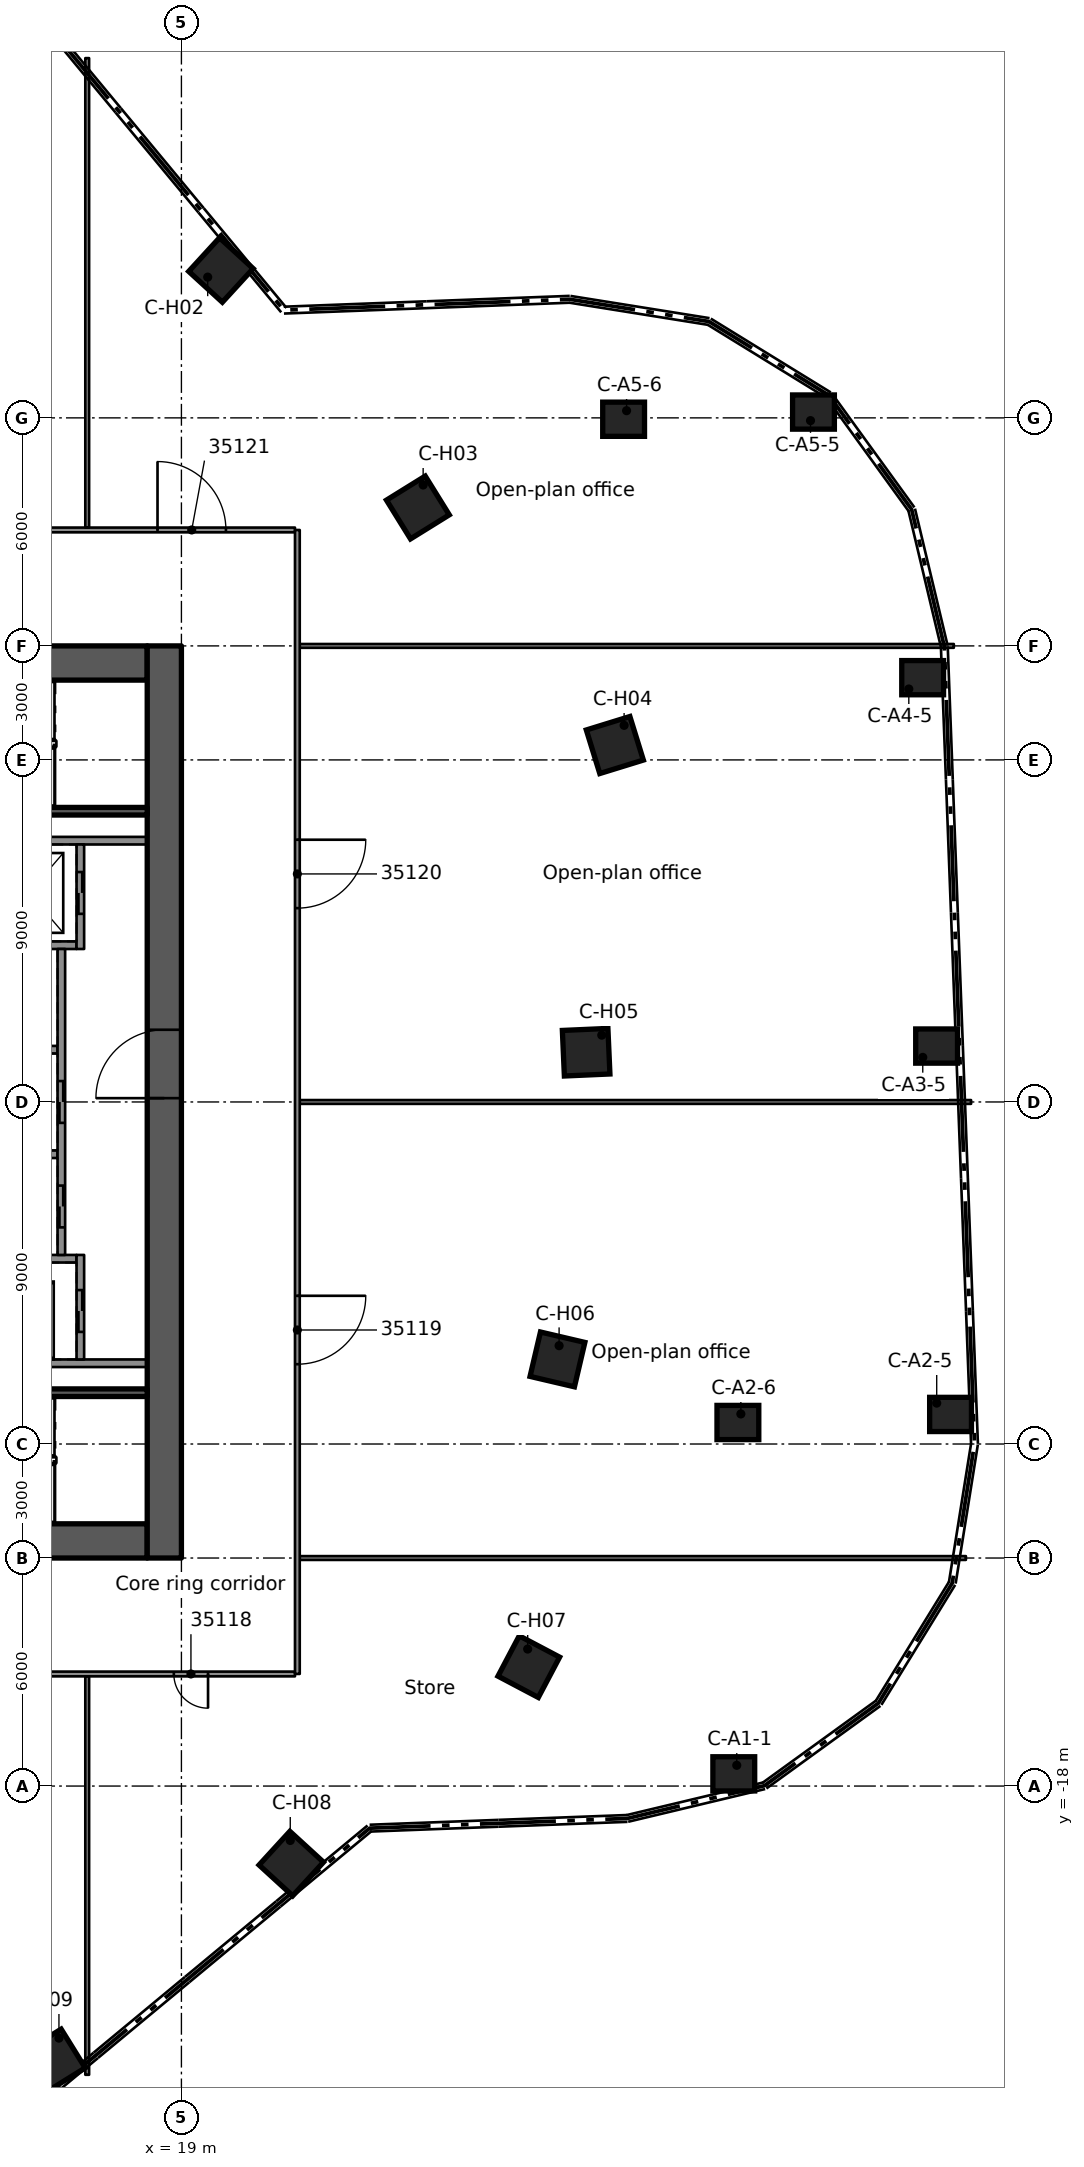
"""IFC4 building model, lengths in metres.
Left out: names, types, materials, properties, quantities, classifications, styles, units other than length and angle.
Written with IfcOpenShell. Run it as: python <this file> out.ifc"""

import sys

from ifc_helpers import new_model, si_unit, direction, frame, frame_2d, origin, origin_2d, place, context, subcontext, project, spatial, rectangle, extrude, element, fill, save


model = new_model("IFC4")
c1 = context("Model", 3, precision=1e-05, world=origin(), true_north=direction((0.0, 1.0)))
c2 = subcontext(c1, "Body", "Model", "MODEL_VIEW")
j1 = project(units=[si_unit("LENGTHUNIT", "METRE"), si_unit("PLANEANGLEUNIT", "RADIAN")], contexts=[c1])
p1 = place(None, origin())
s1 = spatial("IfcSite", under=j1, at=p1, CompositionType="ELEMENT")
p2 = place(p1, origin())
s2 = spatial("IfcBuilding", under=s1, at=p2, CompositionType="ELEMENT")
p3 = place(p2, frame((0.0, 0.0, 170.6)))
s3 = spatial("IfcBuildingStorey", under=s2, at=p3, CompositionType="ELEMENT", Elevation=170.6)
p4 = place(p3, frame((8.9, 11.55, 0.0), z_axis=(0.0, 0.0, 1.0), x_axis=(1.0, 0.0, 0.0)))
e1 = element("IfcWall", 1, at=p4, inside=s3, PredefinedType="SHEAR", context=c2, shape_type="SweptSolid", body=[
    extrude(rectangle(XDim=9.2, YDim=0.9, at=frame_2d((4.6, 0.0))), origin(), (0.0, 0.0, 1.0), 3.5),
])
p5 = place(p4, frame((3.0, 0.0, 0.0)))
e2 = element("IfcOpeningElement", 2, at=p5, cuts=e1, PredefinedType="OPENING", context=c2, shape_type="SweptSolid", body=[
    extrude(rectangle(XDim=1.1, YDim=2.1, at=frame_2d((0.55, 1.05))), frame((0.0, 0.46, 0.0), z_axis=(0.0, -1.0, 0.0), x_axis=(1.0, 0.0, 0.0)), (0.0, 0.0, 1.0), 0.92),
])
p6 = place(p4, frame((0.77, 0.0, 0.0)))
e3 = element("IfcOpeningElement", 3, at=p6, cuts=e1, PredefinedType="OPENING", context=c2, shape_type="SweptSolid", body=[
    extrude(rectangle(XDim=0.9, YDim=2.1, at=frame_2d((0.45, 1.05))), frame((0.0, 0.46, 0.0), z_axis=(0.0, -1.0, 0.0), x_axis=(1.0, 0.0, 0.0)), (0.0, 0.0, 1.0), 0.92),
])
p7 = place(p3, frame((8.9, -11.55, 0.0), z_axis=(0.0, 0.0, 1.0), x_axis=(1.0, 0.0, 0.0)))
e4 = element("IfcWall", 4, at=p7, inside=s3, PredefinedType="SHEAR", context=c2, shape_type="SweptSolid", body=[
    extrude(rectangle(XDim=9.2, YDim=0.9, at=frame_2d((4.6, 0.0))), origin(), (0.0, 0.0, 1.0), 3.5),
])
p8 = place(p7, frame((3.0, 0.0, 0.0)))
e5 = element("IfcOpeningElement", 5, at=p8, cuts=e4, PredefinedType="OPENING", context=c2, shape_type="SweptSolid", body=[
    extrude(rectangle(XDim=1.1, YDim=2.1, at=frame_2d((0.55, 1.05))), frame((0.0, 0.46, 0.0), z_axis=(0.0, -1.0, 0.0), x_axis=(1.0, 0.0, 0.0)), (0.0, 0.0, 1.0), 0.92),
])
p9 = place(p3, frame((18.55, -12.0, 0.0), z_axis=(0.0, 0.0, 1.0), x_axis=(0.0, 1.0, 0.0)))
e6 = element("IfcWall", 6, at=p9, inside=s3, PredefinedType="SHEAR", context=c2, shape_type="SweptSolid", body=[
    extrude(rectangle(XDim=24.0, YDim=0.9, at=frame_2d((12.0, 0.0))), origin(), (0.0, 0.0, 1.0), 3.5),
])
p10 = place(p9, frame((12.1, 0.0, 0.0)))
e7 = element("IfcOpeningElement", 7, at=p10, cuts=e6, PredefinedType="OPENING", context=c2, shape_type="SweptSolid", body=[
    extrude(rectangle(XDim=1.8, YDim=2.1, at=frame_2d((0.9, 1.05))), frame((0.0, 0.46, 0.0), z_axis=(0.0, -1.0, 0.0), x_axis=(1.0, 0.0, 0.0)), (0.0, 0.0, 1.0), 0.92),
])
for number, where, z_axis, x_axis in (
    (8, (33.535, -17.679, 0.0), (0.0, 0.0, 1.0), (1.0, 0.0, 0.0)),
    (9, (39.239, -8.222, 0.0), (0.0, 0.0, 1.0), (1.0, 0.0, 0.0)),
    (10, (33.643, -8.434, 0.0), (0.0, 0.0, 1.0), (1.0, 0.0, 0.0)),
    (11, (38.872, 1.471, 0.0), (0.0, 0.0, 1.0), (1.0, 0.0, 0.0)),
    (12, (38.505, 11.164, 0.0), (0.0, 0.0, 1.0), (1.0, 0.0, 0.0)),
    (13, (35.632, 18.153, 0.0), (0.0, 0.0, 1.0), (1.0, 0.0, 0.0)),
    (14, (30.636, 17.964, 0.0), (0.0, 0.0, 1.0), (1.0, 0.0, 0.0)),
):
    element("IfcColumn", number, at=place(p3, frame(where, z_axis=z_axis, x_axis=x_axis)), inside=s3, PredefinedType="COLUMN", context=c2, shape_type="SweptSolid", body=[
        extrude(rectangle(XDim=1.1, YDim=0.9, at=origin_2d()), origin(), (0.0, 0.0, 1.0), 3.5),
    ])
for number, where, z_axis, x_axis in (
    (15, (14.858, 28.141, 0.0), (0.0, 0.0, 1.0), (0.467, 0.884, 0.0)),
    (16, (20.04, 21.891, 0.0), (0.0, 0.0, 1.0), (0.675, 0.738, 0.0)),
    (17, (25.222, 15.642, 0.0), (0.0, 0.0, 1.0), (0.85, 0.527, 0.0)),
    (18, (30.405, 9.392, 0.0), (0.0, 0.0, 1.0), (0.955, 0.295, 0.0)),
    (19, (29.65, 1.309, 0.0), (0.0, 0.0, 1.0), (0.999, 0.044, 0.0)),
    (20, (28.895, -6.774, 0.0), (0.0, 0.0, 1.0), (0.974, -0.228, 0.0)),
    (21, (28.141, -14.858, 0.0), (0.0, 0.0, 1.0), (0.884, -0.467, 0.0)),
    (22, (21.891, -20.04, 0.0), (0.0, 0.0, 1.0), (0.738, -0.675, 0.0)),
    (23, (15.642, -25.222, 0.0), (0.0, 0.0, 1.0), (0.527, -0.85, 0.0)),
):
    element("IfcColumn", number, at=place(p3, frame(where, z_axis=z_axis, x_axis=x_axis)), inside=s3, PredefinedType="COLUMN", context=c2, shape_type="SweptSolid", body=[
        extrude(rectangle(XDim=1.2, YDim=1.2, at=origin_2d()), origin(), (0.0, 0.0, 1.0), 3.5),
    ])
for number, where, z_axis, x_axis in (
    (24, (11.54, -6.875, 0.0), (0.0, 0.0, 1.0), (1.0, 0.0, 0.0)),
    (25, (11.54, 6.875, 0.0), (0.0, 0.0, 1.0), (1.0, 0.0, 0.0)),
):
    element("IfcWall", number, at=place(p3, frame(where, z_axis=z_axis, x_axis=x_axis)), inside=s3, PredefinedType="SOLIDWALL", context=c2, shape_type="SweptSolid", body=[
        extrude(rectangle(XDim=6.56, YDim=0.2, at=frame_2d((3.28, 0.0))), origin(), (0.0, 0.0, 1.0), 3.08),
    ])
p11 = place(p3, frame((13.74, 4.125, 0.0), z_axis=(0.0, 0.0, 1.0), x_axis=(1.0, 0.0, 0.0)))
e26 = element("IfcWall", 26, at=p11, inside=s3, PredefinedType="SOLIDWALL", context=c2, shape_type="SweptSolid", body=[
    extrude(rectangle(XDim=2.5, YDim=0.2, at=frame_2d((1.25, 0.0))), origin(), (0.0, 0.0, 1.0), 3.08),
])
p12 = place(p3, frame((13.74, 1.375, 0.0), z_axis=(0.0, 0.0, 1.0), x_axis=(1.0, 0.0, 0.0)))
e27 = element("IfcWall", 27, at=p12, inside=s3, PredefinedType="SOLIDWALL", context=c2, shape_type="SweptSolid", body=[
    extrude(rectangle(XDim=2.0, YDim=0.2, at=frame_2d((1.0, 0.0))), origin(), (0.0, 0.0, 1.0), 3.08),
])
p13 = place(p3, frame((11.54, -1.375, 0.0), z_axis=(0.0, 0.0, 1.0), x_axis=(1.0, 0.0, 0.0)))
e28 = element("IfcWall", 28, at=p13, inside=s3, PredefinedType="SOLIDWALL", context=c2, shape_type="SweptSolid", body=[
    extrude(rectangle(XDim=4.2, YDim=0.2, at=frame_2d((2.1, 0.0))), origin(), (0.0, 0.0, 1.0), 3.08),
])
p14 = place(p3, frame((11.54, -4.125, 0.0), z_axis=(0.0, 0.0, 1.0), x_axis=(1.0, 0.0, 0.0)))
e29 = element("IfcWall", 29, at=p14, inside=s3, PredefinedType="SOLIDWALL", context=c2, shape_type="SweptSolid", body=[
    extrude(rectangle(XDim=4.7, YDim=0.2, at=frame_2d((2.35, 0.0))), origin(), (0.0, 0.0, 1.0), 3.08),
])
p15 = place(p3, frame((16.34, 6.775, 0.0), z_axis=(0.0, 0.0, 1.0), x_axis=(0.0, -1.0, 0.0)))
e30 = element("IfcWall", 30, at=p15, inside=s3, PredefinedType="SOLIDWALL", context=c2, shape_type="SweptSolid", body=[
    extrude(rectangle(XDim=2.75, YDim=0.2, at=frame_2d((1.375, 0.0))), origin(), (0.0, 0.0, 1.0), 3.08),
])
p16 = place(p15, frame((0.725, 0.0, 0.0)))
e31 = element("IfcOpeningElement", 31, at=p16, cuts=e30, PredefinedType="OPENING", context=c2, shape_type="SweptSolid", body=[
    extrude(rectangle(XDim=1.1, YDim=2.1, at=frame_2d((0.55, 1.05))), frame((0.0, 0.11, 0.0), z_axis=(0.0, -1.0, 0.0), x_axis=(1.0, 0.0, 0.0)), (0.0, 0.0, 1.0), 0.22),
])
p17 = place(p3, frame((15.84, 4.025, 0.0), z_axis=(0.0, 0.0, 1.0), x_axis=(0.0, -1.0, 0.0)))
e32 = element("IfcWall", 32, at=p17, inside=s3, PredefinedType="SOLIDWALL", context=c2, shape_type="SweptSolid", body=[
    extrude(rectangle(XDim=8.05, YDim=0.2, at=frame_2d((4.025, 0.0))), origin(), (0.0, 0.0, 1.0), 3.08),
])
p18 = place(p17, frame((3.475, 0.0, 0.0)))
e33 = element("IfcOpeningElement", 33, at=p18, cuts=e32, PredefinedType="OPENING", context=c2, shape_type="SweptSolid", body=[
    extrude(rectangle(XDim=1.1, YDim=2.1, at=frame_2d((0.55, 1.05))), frame((0.0, 0.11, 0.0), z_axis=(0.0, -1.0, 0.0), x_axis=(1.0, 0.0, 0.0)), (0.0, 0.0, 1.0), 0.22),
])
p19 = place(p17, frame((6.225, 0.0, 0.0)))
e34 = element("IfcOpeningElement", 34, at=p19, cuts=e32, PredefinedType="OPENING", context=c2, shape_type="SweptSolid", body=[
    extrude(rectangle(XDim=1.1, YDim=2.1, at=frame_2d((0.55, 1.05))), frame((0.0, 0.11, 0.0), z_axis=(0.0, -1.0, 0.0), x_axis=(1.0, 0.0, 0.0)), (0.0, 0.0, 1.0), 0.22),
])
p20 = place(p3, frame((16.34, -4.025, 0.0), z_axis=(0.0, 0.0, 1.0), x_axis=(0.0, -1.0, 0.0)))
e35 = element("IfcWall", 35, at=p20, inside=s3, PredefinedType="SOLIDWALL", context=c2, shape_type="SweptSolid", body=[
    extrude(rectangle(XDim=2.75, YDim=0.2, at=frame_2d((1.375, 0.0))), origin(), (0.0, 0.0, 1.0), 3.08),
])
p21 = place(p20, frame((0.925, 0.0, 0.0)))
e36 = element("IfcOpeningElement", 36, at=p21, cuts=e35, PredefinedType="OPENING", context=c2, shape_type="SweptSolid", body=[
    extrude(rectangle(XDim=1.1, YDim=2.1, at=frame_2d((0.55, 1.05))), frame((0.0, 0.11, 0.0), z_axis=(0.0, -1.0, 0.0), x_axis=(1.0, 0.0, 0.0)), (0.0, 0.0, 1.0), 0.22),
])
for number, where, z_axis, x_axis in (
    (37, (11.54, -7.65, 0.0), (0.0, 0.0, 1.0), (1.0, 0.0, 0.0)),
    (38, (11.54, 7.65, 0.0), (0.0, 0.0, 1.0), (1.0, 0.0, 0.0)),
):
    element("IfcWall", number, at=place(p3, frame(where, z_axis=z_axis, x_axis=x_axis)), inside=s3, PredefinedType="SOLIDWALL", context=c2, shape_type="SweptSolid", body=[
        extrude(rectangle(XDim=6.56, YDim=0.2, at=frame_2d((3.28, 0.0))), origin(), (0.0, 0.0, 1.0), 3.08),
    ])
p22 = place(p3, frame((21.988, -15.051, 0.0), z_axis=(0.0, 0.0, 1.0), x_axis=(-1.0, 0.0, 0.0)))
e39 = element("IfcWall", 39, at=p22, inside=s3, PredefinedType="PARTITIONING", context=c2, shape_type="SweptSolid", body=[
    extrude(rectangle(XDim=10.997, YDim=0.125, at=frame_2d((5.499, 0.0))), origin(), (0.0, 0.0, 1.0), 3.06),
])
p23 = place(p22, frame((7.816, 0.0, 0.0)))
e40 = element("IfcOpeningElement", 40, at=p23, cuts=e39, PredefinedType="OPENING", context=c2, shape_type="SweptSolid", body=[
    extrude(rectangle(XDim=0.9, YDim=2.1, at=frame_2d((0.45, 1.05))), frame((0.0, 0.073, 0.0), z_axis=(0.0, -1.0, 0.0), x_axis=(1.0, 0.0, 0.0)), (0.0, 0.0, 1.0), 0.145),
])
p24 = place(p22, frame((2.288, 0.0, 0.0)))
e41 = element("IfcOpeningElement", 41, at=p24, cuts=e39, PredefinedType="OPENING", context=c2, shape_type="SweptSolid", body=[
    extrude(rectangle(XDim=0.9, YDim=2.1, at=frame_2d((0.45, 1.05))), frame((0.0, 0.073, 0.0), z_axis=(0.0, -1.0, 0.0), x_axis=(1.0, 0.0, 0.0)), (0.0, 0.0, 1.0), 0.145),
])
p25 = place(p3, frame((22.113, -12.0, 0.0), z_axis=(0.0, 0.0, 1.0), x_axis=(1.0, 0.0, 0.0)))
e42 = element("IfcWall", 42, at=p25, inside=s3, PredefinedType="PARTITIONING", context=c2, shape_type="SweptSolid", body=[
    extrude(rectangle(XDim=17.53, YDim=0.1, at=frame_2d((8.765, 0.0))), origin(), (0.0, 0.0, 1.0), 3.06),
])
p26 = place(p3, frame((22.113, 0.0, 0.0), z_axis=(0.0, 0.0, 1.0), x_axis=(1.0, 0.0, 0.0)))
e43 = element("IfcWall", 43, at=p26, inside=s3, PredefinedType="PARTITIONING", context=c2, shape_type="SweptSolid", body=[
    extrude(rectangle(XDim=17.666, YDim=0.1, at=frame_2d((8.833, 0.0))), origin(), (0.0, 0.0, 1.0), 3.06),
])
p27 = place(p3, frame((22.113, 12.0, 0.0), z_axis=(0.0, 0.0, 1.0), x_axis=(1.0, 0.0, 0.0)))
e44 = element("IfcWall", 44, at=p27, inside=s3, PredefinedType="PARTITIONING", context=c2, shape_type="SweptSolid", body=[
    extrude(rectangle(XDim=17.212, YDim=0.1, at=frame_2d((8.606, 0.0))), origin(), (0.0, 0.0, 1.0), 3.06),
])
p28 = place(p3, frame((10.991, 15.051, 0.0), z_axis=(0.0, 0.0, 1.0), x_axis=(1.0, 0.0, 0.0)))
e45 = element("IfcWall", 45, at=p28, inside=s3, PredefinedType="PARTITIONING", context=c2, shape_type="SweptSolid", body=[
    extrude(rectangle(XDim=10.997, YDim=0.125, at=frame_2d((5.499, 0.0))), origin(), (0.0, 0.0, 1.0), 3.06),
])
p29 = place(p28, frame((7.38, 0.0, 0.0)))
e46 = element("IfcOpeningElement", 46, at=p29, cuts=e45, PredefinedType="OPENING", context=c2, shape_type="SweptSolid", body=[
    extrude(rectangle(XDim=1.8, YDim=2.1, at=frame_2d((0.9, 1.05))), frame((0.0, 0.073, 0.0), z_axis=(0.0, -1.0, 0.0), x_axis=(1.0, 0.0, 0.0)), (0.0, 0.0, 1.0), 0.145),
])
p30 = place(p3, frame((22.051, 15.05, 0.0), z_axis=(0.0, 0.0, 1.0), x_axis=(0.0, -1.0, 0.0)))
e47 = element("IfcWall", 47, at=p30, inside=s3, PredefinedType="PARTITIONING", context=c2, shape_type="SweptSolid", body=[
    extrude(rectangle(XDim=30.1, YDim=0.125, at=frame_2d((15.05, 0.0))), origin(), (0.0, 0.0, 1.0), 3.06),
])
p31 = place(p30, frame((20.15, 0.0, 0.0)))
e48 = element("IfcOpeningElement", 48, at=p31, cuts=e47, PredefinedType="OPENING", context=c2, shape_type="SweptSolid", body=[
    extrude(rectangle(XDim=1.8, YDim=2.1, at=frame_2d((0.9, 1.05))), frame((0.0, 0.073, 0.0), z_axis=(0.0, -1.0, 0.0), x_axis=(1.0, 0.0, 0.0)), (0.0, 0.0, 1.0), 0.145),
])
p32 = place(p30, frame((8.15, 0.0, 0.0)))
e49 = element("IfcOpeningElement", 49, at=p32, cuts=e47, PredefinedType="OPENING", context=c2, shape_type="SweptSolid", body=[
    extrude(rectangle(XDim=1.8, YDim=2.1, at=frame_2d((0.9, 1.05))), frame((0.0, 0.073, 0.0), z_axis=(0.0, -1.0, 0.0), x_axis=(1.0, 0.0, 0.0)), (0.0, 0.0, 1.0), 0.145),
])
p33 = place(p3, frame((16.521, -25.597, 0.0), z_axis=(0.0, 0.0, 1.0), x_axis=(0.0, 1.0, 0.0)))
e50 = element("IfcWall", 50, at=p33, inside=s3, PredefinedType="PARTITIONING", context=c2, shape_type="SweptSolid", body=[
    extrude(rectangle(XDim=10.483, YDim=0.1, at=frame_2d((5.241, 0.0))), origin(), (0.0, 0.0, 1.0), 3.06),
])
p34 = place(p3, frame((16.521, 15.114, 0.0), z_axis=(0.0, 0.0, 1.0), x_axis=(0.0, 1.0, 0.0)))
e51 = element("IfcWall", 51, at=p34, inside=s3, PredefinedType="PARTITIONING", context=c2, shape_type="SweptSolid", body=[
    extrude(rectangle(XDim=12.352, YDim=0.1, at=frame_2d((6.176, 0.0))), origin(), (0.0, 0.0, 1.0), 3.06),
])
p35 = place(p16, origin())
e52 = element("IfcDoor", 52, at=p35, inside=s3, OperationType="DOUBLE_DOOR_SLIDING", PredefinedType="DOOR", context=c2, shape_type="SweptSolid", body=[
    extrude(rectangle(XDim=1.1, YDim=2.1, at=frame_2d((0.55, 1.05))), frame((0.0, 0.025, 0.0), z_axis=(0.0, -1.0, 0.0), x_axis=(1.0, 0.0, 0.0)), (0.0, 0.0, 1.0), 0.05),
])
fill(e31, e52)
p36 = place(p18, origin())
e53 = element("IfcDoor", 53, at=p36, inside=s3, OperationType="DOUBLE_DOOR_SLIDING", PredefinedType="DOOR", context=c2, shape_type="SweptSolid", body=[
    extrude(rectangle(XDim=1.1, YDim=2.1, at=frame_2d((0.55, 1.05))), frame((0.0, 0.025, 0.0), z_axis=(0.0, -1.0, 0.0), x_axis=(1.0, 0.0, 0.0)), (0.0, 0.0, 1.0), 0.05),
])
fill(e33, e53)
p37 = place(p19, origin())
e54 = element("IfcDoor", 54, at=p37, inside=s3, OperationType="DOUBLE_DOOR_SLIDING", PredefinedType="DOOR", context=c2, shape_type="SweptSolid", body=[
    extrude(rectangle(XDim=1.1, YDim=2.1, at=frame_2d((0.55, 1.05))), frame((0.0, 0.025, 0.0), z_axis=(0.0, -1.0, 0.0), x_axis=(1.0, 0.0, 0.0)), (0.0, 0.0, 1.0), 0.05),
])
fill(e34, e54)
p38 = place(p21, origin())
e55 = element("IfcDoor", 55, at=p38, inside=s3, OperationType="DOUBLE_DOOR_SLIDING", PredefinedType="DOOR", context=c2, shape_type="SweptSolid", body=[
    extrude(rectangle(XDim=1.1, YDim=2.1, at=frame_2d((0.55, 1.05))), frame((0.0, 0.025, 0.0), z_axis=(0.0, -1.0, 0.0), x_axis=(1.0, 0.0, 0.0)), (0.0, 0.0, 1.0), 0.05),
])
fill(e36, e55)
p39 = place(p10, origin())
e56 = element("IfcDoor", 56, at=p39, inside=s3, OperationType="SINGLE_SWING_RIGHT", PredefinedType="DOOR", context=c2, shape_type="SweptSolid", body=[
    extrude(rectangle(XDim=1.8, YDim=2.1, at=frame_2d((0.9, 1.05))), frame((0.0, 0.025, 0.0), z_axis=(0.0, -1.0, 0.0), x_axis=(1.0, 0.0, 0.0)), (0.0, 0.0, 1.0), 0.05),
])
fill(e7, e56)
p40 = place(p24, origin())
e57 = element("IfcDoor", 57, at=p40, inside=s3, OperationType="SINGLE_SWING_LEFT", PredefinedType="DOOR", context=c2, shape_type="SweptSolid", body=[
    extrude(rectangle(XDim=0.9, YDim=2.1, at=frame_2d((0.45, 1.05))), frame((0.0, 0.025, 0.0), z_axis=(0.0, -1.0, 0.0), x_axis=(1.0, 0.0, 0.0)), (0.0, 0.0, 1.0), 0.05),
])
fill(e41, e57)
p41 = place(p31, origin())
e58 = element("IfcDoor", 58, at=p41, inside=s3, OperationType="DOUBLE_DOOR_SINGLE_SWING", PredefinedType="DOOR", context=c2, shape_type="SweptSolid", body=[
    extrude(rectangle(XDim=1.8, YDim=2.1, at=frame_2d((0.9, 1.05))), frame((0.0, 0.025, 0.0), z_axis=(0.0, -1.0, 0.0), x_axis=(1.0, 0.0, 0.0)), (0.0, 0.0, 1.0), 0.05),
])
fill(e48, e58)
p42 = place(p32, origin())
e59 = element("IfcDoor", 59, at=p42, inside=s3, OperationType="DOUBLE_DOOR_SINGLE_SWING", PredefinedType="DOOR", context=c2, shape_type="SweptSolid", body=[
    extrude(rectangle(XDim=1.8, YDim=2.1, at=frame_2d((0.9, 1.05))), frame((0.0, 0.025, 0.0), z_axis=(0.0, -1.0, 0.0), x_axis=(1.0, 0.0, 0.0)), (0.0, 0.0, 1.0), 0.05),
])
fill(e49, e59)
p43 = place(p29, origin())
e60 = element("IfcDoor", 60, at=p43, inside=s3, OperationType="DOUBLE_DOOR_SINGLE_SWING", PredefinedType="DOOR", context=c2, shape_type="SweptSolid", body=[
    extrude(rectangle(XDim=1.8, YDim=2.1, at=frame_2d((0.9, 1.05))), frame((0.0, 0.025, 0.0), z_axis=(0.0, -1.0, 0.0), x_axis=(1.0, 0.0, 0.0)), (0.0, 0.0, 1.0), 0.05),
])
fill(e46, e60)
save(model, sys.argv[1])
